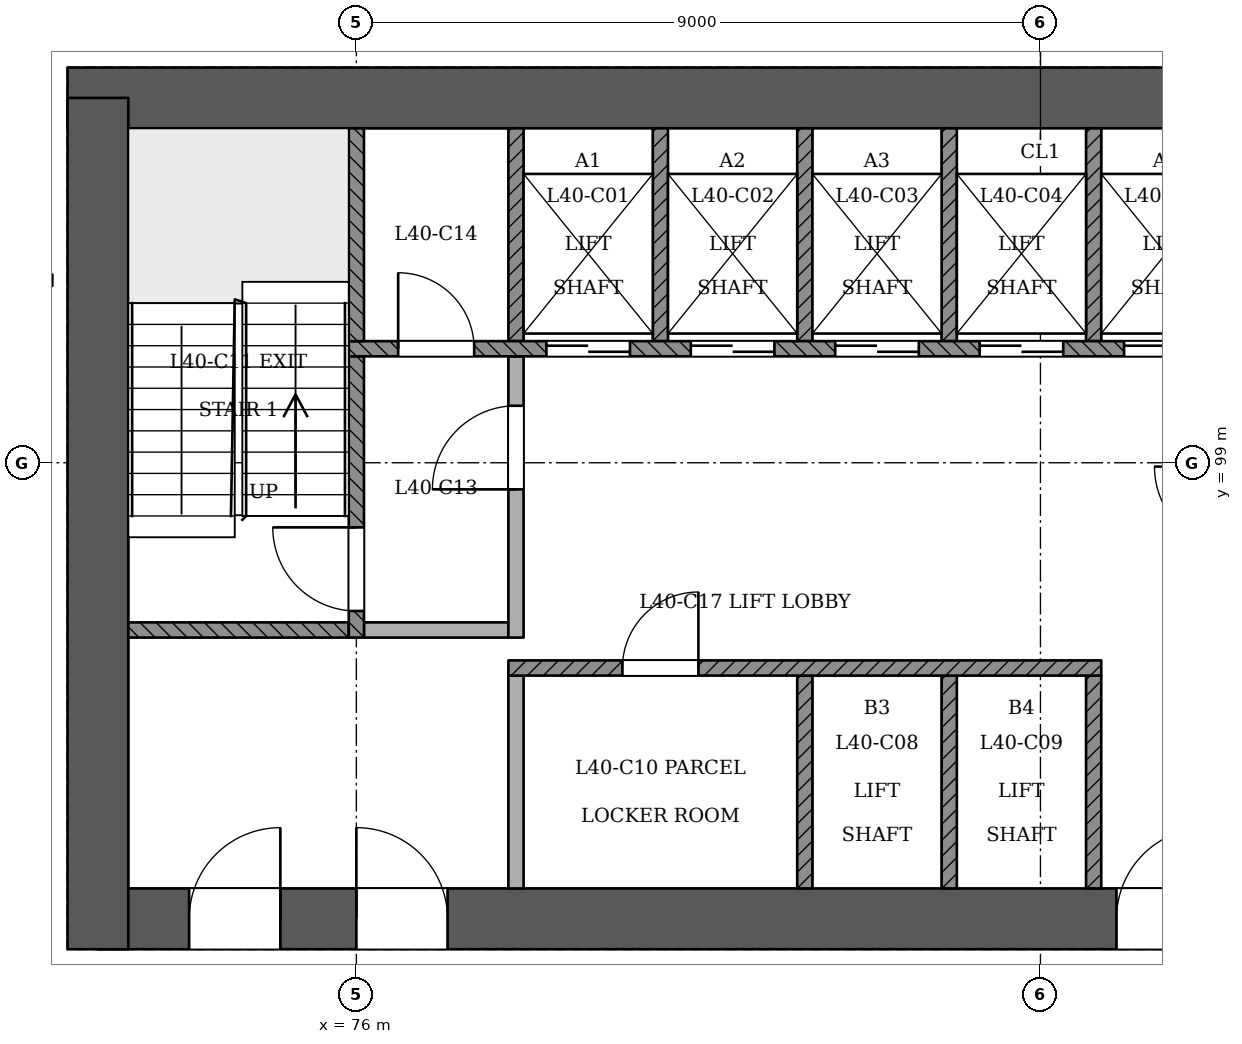
"""IFC4 building model, lengths in metres.
Left out: names, types, materials, properties, quantities, classifications, styles, units other than length and angle.
Written with IfcOpenShell. Run it as: python <this file> out.ifc"""

import sys

from ifc_helpers import new_model, si_unit, direction, frame, frame_2d, origin, place, context, subcontext, project, spatial, rectangle, extrude, element, fill, save


model = new_model("IFC4")
c1 = context("Model", 3, precision=1e-05, world=origin(), true_north=direction((0.0, 1.0)))
c2 = subcontext(c1, "Body", "Model", "MODEL_VIEW")
j1 = project(units=[si_unit("LENGTHUNIT", "METRE"), si_unit("PLANEANGLEUNIT", "RADIAN")], contexts=[c1])
p1 = place(None, origin())
s1 = spatial("IfcSite", under=j1, at=p1, CompositionType="ELEMENT")
p2 = place(p1, origin())
s2 = spatial("IfcBuilding", under=s1, at=p2, CompositionType="ELEMENT")
p3 = place(p2, frame((0.0, 0.0, 156.6)))
s3 = spatial("IfcBuildingStorey", under=s2, at=p3, CompositionType="ELEMENT", Elevation=156.6)
p4 = place(p3, frame((72.6, 93.0, 0.0), z_axis=(0.0, 0.0, 1.0), x_axis=(1.0, 0.0, 0.0)))
e1 = element("IfcWall", 1, at=p4, inside=s3, PredefinedType="SHEAR", context=c2, shape_type="SweptSolid", body=[
    extrude(rectangle(XDim=25.2, YDim=0.8, at=frame_2d((12.6, 0.0))), origin(), (0.0, 0.0, 1.0), 3.6),
])
p5 = place(p4, frame((1.2, 0.0, 0.0)))
e2 = element("IfcOpeningElement", 2, at=p5, cuts=e1, PredefinedType="OPENING", context=c2, shape_type="SweptSolid", body=[
    extrude(rectangle(XDim=1.2, YDim=2.1, at=frame_2d((0.6, 1.05))), frame((0.0, 0.411, 0.0), z_axis=(0.0, -1.0, 0.0), x_axis=(1.0, 0.0, 0.0)), (0.0, 0.0, 1.0), 0.821),
])
p6 = place(p4, frame((3.4, 0.0, 0.0)))
e3 = element("IfcOpeningElement", 3, at=p6, cuts=e1, PredefinedType="OPENING", context=c2, shape_type="SweptSolid", body=[
    extrude(rectangle(XDim=1.2, YDim=2.1, at=frame_2d((0.6, 1.05))), frame((0.0, 0.411, 0.0), z_axis=(0.0, -1.0, 0.0), x_axis=(1.0, 0.0, 0.0)), (0.0, 0.0, 1.0), 0.821),
])
p7 = place(p4, frame((13.4, 0.0, 0.0)))
e4 = element("IfcOpeningElement", 4, at=p7, cuts=e1, PredefinedType="OPENING", context=c2, shape_type="SweptSolid", body=[
    extrude(rectangle(XDim=1.2, YDim=2.1, at=frame_2d((0.6, 1.05))), frame((0.0, 0.411, 0.0), z_axis=(0.0, -1.0, 0.0), x_axis=(1.0, 0.0, 0.0)), (0.0, 0.0, 1.0), 0.821),
])
p8 = place(p4, frame((15.712, 0.0, 0.0)))
e5 = element("IfcOpeningElement", 5, at=p8, cuts=e1, PredefinedType="OPENING", context=c2, shape_type="SweptSolid", body=[
    extrude(rectangle(XDim=1.0, YDim=2.1, at=frame_2d((0.5, 1.05))), frame((0.0, 0.411, 0.0), z_axis=(0.0, -1.0, 0.0), x_axis=(1.0, 0.0, 0.0)), (0.0, 0.0, 1.0), 0.821),
])
p9 = place(p4, frame((19.15, 0.0, 0.0)))
e6 = element("IfcOpeningElement", 6, at=p9, cuts=e1, PredefinedType="OPENING", context=c2, shape_type="SweptSolid", body=[
    extrude(rectangle(XDim=1.0, YDim=2.1, at=frame_2d((0.5, 1.05))), frame((0.0, 0.411, 0.0), z_axis=(0.0, -1.0, 0.0), x_axis=(1.0, 0.0, 0.0)), (0.0, 0.0, 1.0), 0.821),
])
p10 = place(p4, frame((22.688, 0.0, 0.0)))
e7 = element("IfcOpeningElement", 7, at=p10, cuts=e1, PredefinedType="OPENING", context=c2, shape_type="SweptSolid", body=[
    extrude(rectangle(XDim=1.0, YDim=2.1, at=frame_2d((0.5, 1.05))), frame((0.0, 0.411, 0.0), z_axis=(0.0, -1.0, 0.0), x_axis=(1.0, 0.0, 0.0)), (0.0, 0.0, 1.0), 0.821),
])
p11 = place(p3, frame((97.4, 103.8, 0.0), z_axis=(0.0, 0.0, 1.0), x_axis=(-1.0, 0.0, 0.0)))
e8 = element("IfcWall", 8, at=p11, inside=s3, PredefinedType="SHEAR", context=c2, shape_type="SweptSolid", body=[
    extrude(rectangle(XDim=25.2, YDim=0.8, at=frame_2d((12.6, 0.0))), origin(), (0.0, 0.0, 1.0), 3.6),
])
p12 = place(p3, frame((72.6, 103.8, 0.0), z_axis=(0.0, 0.0, 1.0), x_axis=(0.0, -1.0, 0.0)))
e9 = element("IfcWall", 9, at=p12, inside=s3, PredefinedType="SHEAR", context=c2, shape_type="SweptSolid", body=[
    extrude(rectangle(XDim=11.2, YDim=0.8, at=frame_2d((5.6, 0.0))), origin(), (0.0, 0.0, 1.0), 3.6),
])
p13 = place(p3, frame((66.322, 97.326, 0.0), z_axis=(0.0, 0.0, 1.0), x_axis=(0.4999994764, -0.866025706085, 0.0)))
e10 = element("IfcWall", 10, at=p13, inside=s3, PredefinedType="PARTITIONING", context=c2, shape_type="SweptSolid", body=[
    extrude(rectangle(XDim=37.355, YDim=0.15, at=frame_2d((18.678, 0.0))), origin(), (0.0, 0.0, 1.0), 2.75),
])
p14 = place(p13, frame((2.8, 0.0, 0.0)))
e11 = element("IfcOpeningElement", 11, at=p14, cuts=e10, PredefinedType="OPENING", context=c2, shape_type="SweptSolid", body=[
    extrude(rectangle(XDim=1.2, YDim=2.1, at=frame_2d((0.6, 1.05))), frame((0.0, 0.085, 0.0), z_axis=(0.0, -1.0, 0.0), x_axis=(1.0, 0.0, 0.0)), (0.0, 0.0, 1.0), 0.171),
])
p15 = place(p13, frame((11.8, 0.0, 0.0)))
e12 = element("IfcOpeningElement", 12, at=p15, cuts=e10, PredefinedType="OPENING", context=c2, shape_type="SweptSolid", body=[
    extrude(rectangle(XDim=1.2, YDim=2.1, at=frame_2d((0.6, 1.05))), frame((0.0, 0.085, 0.0), z_axis=(0.0, -1.0, 0.0), x_axis=(1.0, 0.0, 0.0)), (0.0, 0.0, 1.0), 0.171),
])
p16 = place(p13, frame((24.15, 0.0, 0.0)))
e13 = element("IfcOpeningElement", 13, at=p16, cuts=e10, PredefinedType="OPENING", context=c2, shape_type="SweptSolid", body=[
    extrude(rectangle(XDim=1.2, YDim=2.1, at=frame_2d((0.6, 1.05))), frame((0.0, 0.085, 0.0), z_axis=(0.0, -1.0, 0.0), x_axis=(1.0, 0.0, 0.0)), (0.0, 0.0, 1.0), 0.171),
])
p17 = place(p13, frame((33.25, 0.0, 0.0)))
e14 = element("IfcOpeningElement", 14, at=p17, cuts=e10, PredefinedType="OPENING", context=c2, shape_type="SweptSolid", body=[
    extrude(rectangle(XDim=1.0, YDim=2.1, at=frame_2d((0.5, 1.05))), frame((0.0, 0.085, 0.0), z_axis=(0.0, -1.0, 0.0), x_axis=(1.0, 0.0, 0.0)), (0.0, 0.0, 1.0), 0.171),
])
p18 = place(p3, frame((85.065, 65.088, 0.0), z_axis=(0.0, 0.0, 1.0), x_axis=(0.500000254076, 0.866025257093, 0.0)))
e15 = element("IfcWall", 15, at=p18, inside=s3, PredefinedType="PARTITIONING", context=c2, shape_type="SweptSolid", body=[
    extrude(rectangle(XDim=37.226, YDim=0.15, at=frame_2d((18.613, 0.0))), origin(), (0.0, 0.0, 1.0), 2.75),
])
p19 = place(p18, frame((0.542, 0.0, 0.0)))
e16 = element("IfcOpeningElement", 16, at=p19, cuts=e15, PredefinedType="OPENING", context=c2, shape_type="SweptSolid", body=[
    extrude(rectangle(XDim=1.2, YDim=2.1, at=frame_2d((0.6, 1.05))), frame((0.0, 0.085, 0.0), z_axis=(0.0, -1.0, 0.0), x_axis=(1.0, 0.0, 0.0)), (0.0, 0.0, 1.0), 0.171),
])
p20 = place(p18, frame((11.876, 0.0, 0.0)))
e17 = element("IfcOpeningElement", 17, at=p20, cuts=e15, PredefinedType="OPENING", context=c2, shape_type="SweptSolid", body=[
    extrude(rectangle(XDim=1.2, YDim=2.1, at=frame_2d((0.6, 1.05))), frame((0.0, 0.085, 0.0), z_axis=(0.0, -1.0, 0.0), x_axis=(1.0, 0.0, 0.0)), (0.0, 0.0, 1.0), 0.171),
])
p21 = place(p18, frame((22.026, 0.0, 0.0)))
e18 = element("IfcOpeningElement", 18, at=p21, cuts=e15, PredefinedType="OPENING", context=c2, shape_type="SweptSolid", body=[
    extrude(rectangle(XDim=1.2, YDim=2.1, at=frame_2d((0.6, 1.05))), frame((0.0, 0.085, 0.0), z_axis=(0.0, -1.0, 0.0), x_axis=(1.0, 0.0, 0.0)), (0.0, 0.0, 1.0), 0.171),
])
p22 = place(p18, frame((31.026, 0.0, 0.0)))
e19 = element("IfcOpeningElement", 19, at=p22, cuts=e15, PredefinedType="OPENING", context=c2, shape_type="SweptSolid", body=[
    extrude(rectangle(XDim=1.2, YDim=2.1, at=frame_2d((0.6, 1.05))), frame((0.0, 0.085, 0.0), z_axis=(0.0, -1.0, 0.0), x_axis=(1.0, 0.0, 0.0)), (0.0, 0.0, 1.0), 0.171),
])
p23 = place(p3, frame((78.1, 93.4, 0.0), z_axis=(0.0, 0.0, 1.0), x_axis=(0.0, 1.0, 0.0)))
e20 = element("IfcWall", 20, at=p23, inside=s3, PredefinedType="PARTITIONING", context=c2, shape_type="SweptSolid", body=[
    extrude(rectangle(XDim=2.8, YDim=0.2, at=frame_2d((1.4, 0.0))), origin(), (0.0, 0.0, 1.0), 3.15),
])
for number, where, z_axis, x_axis in (
    (21, (81.9, 93.4, 0.0), (0.0, 0.0, 1.0), (0.0, 1.0, 0.0)),
    (22, (83.8, 93.4, 0.0), (0.0, 0.0, 1.0), (0.0, 1.0, 0.0)),
    (23, (85.7, 93.4, 0.0), (0.0, 0.0, 1.0), (0.0, 1.0, 0.0)),
):
    element("IfcWall", number, at=place(p3, frame(where, z_axis=z_axis, x_axis=x_axis)), inside=s3, PredefinedType="SOLIDWALL", context=c2, shape_type="SweptSolid", body=[
        extrude(rectangle(XDim=2.8, YDim=0.2, at=frame_2d((1.4, 0.0))), origin(), (0.0, 0.0, 1.0), 3.15),
    ])
p24 = place(p3, frame((78.0, 96.3, 0.0), z_axis=(0.0, 0.0, 1.0), x_axis=(1.0, 0.0, 0.0)))
e24 = element("IfcWall", 24, at=p24, inside=s3, PredefinedType="SOLIDWALL", context=c2, shape_type="SweptSolid", body=[
    extrude(rectangle(XDim=7.8, YDim=0.2, at=frame_2d((3.9, 0.0))), origin(), (0.0, 0.0, 1.0), 3.15),
])
p25 = place(p24, frame((1.5, 0.0, 0.0)))
e25 = element("IfcOpeningElement", 25, at=p25, cuts=e24, PredefinedType="OPENING", context=c2, shape_type="SweptSolid", body=[
    extrude(rectangle(XDim=1.0, YDim=2.1, at=frame_2d((0.5, 1.05))), frame((0.0, 0.11, 0.0), z_axis=(0.0, -1.0, 0.0), x_axis=(1.0, 0.0, 0.0)), (0.0, 0.0, 1.0), 0.221),
])
p26 = place(p3, frame((73.0, 96.8, 0.0), z_axis=(0.0, 0.0, 1.0), x_axis=(1.0, 0.0, 0.0)))
e26 = element("IfcWall", 26, at=p26, inside=s3, PredefinedType="SOLIDWALL", context=c2, shape_type="SweptSolid", body=[
    extrude(rectangle(XDim=2.9, YDim=0.2, at=frame_2d((1.45, 0.0))), origin(), (0.0, 0.0, 1.0), 3.15),
])
p27 = place(p3, frame((76.0, 96.7, 0.0), z_axis=(0.0, 0.0, 1.0), x_axis=(0.0, 1.0, 0.0)))
e27 = element("IfcWall", 27, at=p27, inside=s3, PredefinedType="SOLIDWALL", context=c2, shape_type="SweptSolid", body=[
    extrude(rectangle(XDim=3.7, YDim=0.2, at=frame_2d((1.85, 0.0))), origin(), (0.0, 0.0, 1.0), 3.15),
])
p28 = place(p27, frame((0.35, 0.0, 0.0)))
e28 = element("IfcOpeningElement", 28, at=p28, cuts=e27, PredefinedType="OPENING", context=c2, shape_type="SweptSolid", body=[
    extrude(rectangle(XDim=1.1, YDim=2.1, at=frame_2d((0.55, 1.05))), frame((0.0, 0.11, 0.0), z_axis=(0.0, -1.0, 0.0), x_axis=(1.0, 0.0, 0.0)), (0.0, 0.0, 1.0), 0.221),
])
p29 = place(p3, frame((76.1, 96.8, 0.0), z_axis=(0.0, 0.0, 1.0), x_axis=(1.0, 0.0, 0.0)))
e29 = element("IfcWall", 29, at=p29, inside=s3, PredefinedType="PARTITIONING", context=c2, shape_type="SweptSolid", body=[
    extrude(rectangle(XDim=1.9, YDim=0.2, at=frame_2d((0.95, 0.0))), origin(), (0.0, 0.0, 1.0), 3.15),
])
p30 = place(p3, frame((78.1, 96.7, 0.0), z_axis=(0.0, 0.0, 1.0), x_axis=(0.0, 1.0, 0.0)))
e30 = element("IfcWall", 30, at=p30, inside=s3, PredefinedType="PARTITIONING", context=c2, shape_type="SweptSolid", body=[
    extrude(rectangle(XDim=3.7, YDim=0.2, at=frame_2d((1.85, 0.0))), origin(), (0.0, 0.0, 1.0), 3.15),
])
p31 = place(p30, frame((1.95, 0.0, 0.0)))
e31 = element("IfcOpeningElement", 31, at=p31, cuts=e30, PredefinedType="OPENING", context=c2, shape_type="SweptSolid", body=[
    extrude(rectangle(XDim=1.1, YDim=2.1, at=frame_2d((0.55, 1.05))), frame((0.0, 0.11, 0.0), z_axis=(0.0, -1.0, 0.0), x_axis=(1.0, 0.0, 0.0)), (0.0, 0.0, 1.0), 0.221),
])
p32 = place(p3, frame((75.9, 100.5, 0.0), z_axis=(0.0, 0.0, 1.0), x_axis=(1.0, 0.0, 0.0)))
e32 = element("IfcWall", 32, at=p32, inside=s3, PredefinedType="SOLIDWALL", context=c2, shape_type="SweptSolid", body=[
    extrude(rectangle(XDim=18.2, YDim=0.2, at=frame_2d((9.1, 0.0))), origin(), (0.0, 0.0, 1.0), 3.15),
])
p33 = place(p32, frame((2.6, 0.0, 0.0)))
e33 = element("IfcOpeningElement", 33, at=p33, cuts=e32, PredefinedType="OPENING", context=c2, shape_type="SweptSolid", body=[
    extrude(rectangle(XDim=1.1, YDim=2.1, at=frame_2d((0.55, 1.05))), frame((0.0, 0.11, 0.0), z_axis=(0.0, -1.0, 0.0), x_axis=(1.0, 0.0, 0.0)), (0.0, 0.0, 1.0), 0.221),
])
p34 = place(p32, frame((4.5, 0.0, 0.0)))
e34 = element("IfcOpeningElement", 34, at=p34, cuts=e32, PredefinedType="OPENING", context=c2, shape_type="SweptSolid", body=[
    extrude(rectangle(XDim=1.1, YDim=2.1, at=frame_2d((0.55, 1.05))), frame((0.0, 0.11, 0.0), z_axis=(0.0, -1.0, 0.0), x_axis=(1.0, 0.0, 0.0)), (0.0, 0.0, 1.0), 0.221),
])
p35 = place(p32, frame((6.4, 0.0, 0.0)))
e35 = element("IfcOpeningElement", 35, at=p35, cuts=e32, PredefinedType="OPENING", context=c2, shape_type="SweptSolid", body=[
    extrude(rectangle(XDim=1.1, YDim=2.1, at=frame_2d((0.55, 1.05))), frame((0.0, 0.11, 0.0), z_axis=(0.0, -1.0, 0.0), x_axis=(1.0, 0.0, 0.0)), (0.0, 0.0, 1.0), 0.221),
])
p36 = place(p32, frame((8.3, 0.0, 0.0)))
e36 = element("IfcOpeningElement", 36, at=p36, cuts=e32, PredefinedType="OPENING", context=c2, shape_type="SweptSolid", body=[
    extrude(rectangle(XDim=1.1, YDim=2.1, at=frame_2d((0.55, 1.05))), frame((0.0, 0.11, 0.0), z_axis=(0.0, -1.0, 0.0), x_axis=(1.0, 0.0, 0.0)), (0.0, 0.0, 1.0), 0.221),
])
p37 = place(p32, frame((10.2, 0.0, 0.0)))
e37 = element("IfcOpeningElement", 37, at=p37, cuts=e32, PredefinedType="OPENING", context=c2, shape_type="SweptSolid", body=[
    extrude(rectangle(XDim=1.1, YDim=2.1, at=frame_2d((0.55, 1.05))), frame((0.0, 0.11, 0.0), z_axis=(0.0, -1.0, 0.0), x_axis=(1.0, 0.0, 0.0)), (0.0, 0.0, 1.0), 0.221),
])
p38 = place(p32, frame((12.1, 0.0, 0.0)))
e38 = element("IfcOpeningElement", 38, at=p38, cuts=e32, PredefinedType="OPENING", context=c2, shape_type="SweptSolid", body=[
    extrude(rectangle(XDim=1.1, YDim=2.1, at=frame_2d((0.55, 1.05))), frame((0.0, 0.11, 0.0), z_axis=(0.0, -1.0, 0.0), x_axis=(1.0, 0.0, 0.0)), (0.0, 0.0, 1.0), 0.221),
])
p39 = place(p32, frame((14.0, 0.0, 0.0)))
e39 = element("IfcOpeningElement", 39, at=p39, cuts=e32, PredefinedType="OPENING", context=c2, shape_type="SweptSolid", body=[
    extrude(rectangle(XDim=1.1, YDim=2.1, at=frame_2d((0.55, 1.05))), frame((0.0, 0.11, 0.0), z_axis=(0.0, -1.0, 0.0), x_axis=(1.0, 0.0, 0.0)), (0.0, 0.0, 1.0), 0.221),
])
p40 = place(p32, frame((0.65, 0.0, 0.0)))
e40 = element("IfcOpeningElement", 40, at=p40, cuts=e32, PredefinedType="OPENING", context=c2, shape_type="SweptSolid", body=[
    extrude(rectangle(XDim=1.0, YDim=2.1, at=frame_2d((0.5, 1.05))), frame((0.0, 0.11, 0.0), z_axis=(0.0, -1.0, 0.0), x_axis=(1.0, 0.0, 0.0)), (0.0, 0.0, 1.0), 0.221),
])
p41 = place(p32, frame((16.3, 0.0, 0.0)))
e41 = element("IfcOpeningElement", 41, at=p41, cuts=e32, PredefinedType="OPENING", context=c2, shape_type="SweptSolid", body=[
    extrude(rectangle(XDim=1.0, YDim=2.1, at=frame_2d((0.5, 1.05))), frame((0.0, 0.11, 0.0), z_axis=(0.0, -1.0, 0.0), x_axis=(1.0, 0.0, 0.0)), (0.0, 0.0, 1.0), 0.221),
])
for number, where, z_axis, x_axis in (
    (42, (76.0, 100.6, 0.0), (0.0, 0.0, 1.0), (0.0, 1.0, 0.0)),
    (43, (78.1, 100.6, 0.0), (0.0, 0.0, 1.0), (0.0, 1.0, 0.0)),
    (44, (80.0, 100.6, 0.0), (0.0, 0.0, 1.0), (0.0, 1.0, 0.0)),
    (45, (81.9, 100.6, 0.0), (0.0, 0.0, 1.0), (0.0, 1.0, 0.0)),
    (46, (83.8, 100.6, 0.0), (0.0, 0.0, 1.0), (0.0, 1.0, 0.0)),
    (47, (85.7, 100.6, 0.0), (0.0, 0.0, 1.0), (0.0, 1.0, 0.0)),
):
    element("IfcWall", number, at=place(p3, frame(where, z_axis=z_axis, x_axis=x_axis)), inside=s3, PredefinedType="SOLIDWALL", context=c2, shape_type="SweptSolid", body=[
        extrude(rectangle(XDim=2.8, YDim=0.2, at=frame_2d((1.4, 0.0))), origin(), (0.0, 0.0, 1.0), 3.15),
    ])
p42 = place(p33, origin())
e48 = element("IfcDoor", 48, at=p42, inside=s3, OperationType="SLIDING_TO_RIGHT", PredefinedType="NOTDEFINED", context=c2, shape_type="SweptSolid", body=[
    extrude(rectangle(XDim=1.1, YDim=2.1, at=frame_2d((0.55, 1.05))), frame((0.0, 0.025, 0.0), z_axis=(0.0, -1.0, 0.0), x_axis=(1.0, 0.0, 0.0)), (0.0, 0.0, 1.0), 0.05),
])
fill(e33, e48)
p43 = place(p34, origin())
e49 = element("IfcDoor", 49, at=p43, inside=s3, OperationType="SLIDING_TO_LEFT", PredefinedType="NOTDEFINED", context=c2, shape_type="SweptSolid", body=[
    extrude(rectangle(XDim=1.1, YDim=2.1, at=frame_2d((0.55, 1.05))), frame((0.0, 0.025, 0.0), z_axis=(0.0, -1.0, 0.0), x_axis=(1.0, 0.0, 0.0)), (0.0, 0.0, 1.0), 0.05),
])
fill(e34, e49)
p44 = place(p35, origin())
e50 = element("IfcDoor", 50, at=p44, inside=s3, OperationType="SLIDING_TO_RIGHT", PredefinedType="NOTDEFINED", context=c2, shape_type="SweptSolid", body=[
    extrude(rectangle(XDim=1.1, YDim=2.1, at=frame_2d((0.55, 1.05))), frame((0.0, 0.025, 0.0), z_axis=(0.0, -1.0, 0.0), x_axis=(1.0, 0.0, 0.0)), (0.0, 0.0, 1.0), 0.05),
])
fill(e35, e50)
p45 = place(p36, origin())
e51 = element("IfcDoor", 51, at=p45, inside=s3, OperationType="SLIDING_TO_LEFT", PredefinedType="NOTDEFINED", context=c2, shape_type="SweptSolid", body=[
    extrude(rectangle(XDim=1.1, YDim=2.1, at=frame_2d((0.55, 1.05))), frame((0.0, 0.025, 0.0), z_axis=(0.0, -1.0, 0.0), x_axis=(1.0, 0.0, 0.0)), (0.0, 0.0, 1.0), 0.05),
])
fill(e36, e51)
p46 = place(p37, origin())
e52 = element("IfcDoor", 52, at=p46, inside=s3, OperationType="SLIDING_TO_RIGHT", PredefinedType="NOTDEFINED", context=c2, shape_type="SweptSolid", body=[
    extrude(rectangle(XDim=1.1, YDim=2.1, at=frame_2d((0.55, 1.05))), frame((0.0, 0.025, 0.0), z_axis=(0.0, -1.0, 0.0), x_axis=(1.0, 0.0, 0.0)), (0.0, 0.0, 1.0), 0.05),
])
fill(e37, e52)
p47 = place(p28, origin())
e53 = element("IfcDoor", 53, at=p47, inside=s3, OperationType="SINGLE_SWING_RIGHT", PredefinedType="NOTDEFINED", context=c2, shape_type="SweptSolid", body=[
    extrude(rectangle(XDim=1.1, YDim=2.1, at=frame_2d((0.55, 1.05))), frame((0.0, 0.025, 0.0), z_axis=(0.0, -1.0, 0.0), x_axis=(1.0, 0.0, 0.0)), (0.0, 0.0, 1.0), 0.05),
])
fill(e28, e53)
p48 = place(p31, origin())
e54 = element("IfcDoor", 54, at=p48, inside=s3, OperationType="SINGLE_SWING_LEFT", PredefinedType="NOTDEFINED", context=c2, shape_type="SweptSolid", body=[
    extrude(rectangle(XDim=1.1, YDim=2.1, at=frame_2d((0.55, 1.05))), frame((0.0, 0.025, 0.0), z_axis=(0.0, -1.0, 0.0), x_axis=(1.0, 0.0, 0.0)), (0.0, 0.0, 1.0), 0.05),
])
fill(e31, e54)
p49 = place(p5, origin())
e55 = element("IfcDoor", 55, at=p49, inside=s3, OperationType="SINGLE_SWING_RIGHT", PredefinedType="NOTDEFINED", context=c2, shape_type="SweptSolid", body=[
    extrude(rectangle(XDim=1.2, YDim=2.1, at=frame_2d((0.6, 1.05))), frame((0.0, 0.025, 0.0), z_axis=(0.0, -1.0, 0.0), x_axis=(1.0, 0.0, 0.0)), (0.0, 0.0, 1.0), 0.05),
])
fill(e2, e55)
p50 = place(p6, origin())
e56 = element("IfcDoor", 56, at=p50, inside=s3, OperationType="SINGLE_SWING_LEFT", PredefinedType="NOTDEFINED", context=c2, shape_type="SweptSolid", body=[
    extrude(rectangle(XDim=1.2, YDim=2.1, at=frame_2d((0.6, 1.05))), frame((0.0, 0.025, 0.0), z_axis=(0.0, -1.0, 0.0), x_axis=(1.0, 0.0, 0.0)), (0.0, 0.0, 1.0), 0.05),
])
fill(e3, e56)
p51 = place(p7, origin())
e57 = element("IfcDoor", 57, at=p51, inside=s3, OperationType="SINGLE_SWING_RIGHT", PredefinedType="NOTDEFINED", context=c2, shape_type="SweptSolid", body=[
    extrude(rectangle(XDim=1.2, YDim=2.1, at=frame_2d((0.6, 1.05))), frame((0.0, 0.025, 0.0), z_axis=(0.0, -1.0, 0.0), x_axis=(1.0, 0.0, 0.0)), (0.0, 0.0, 1.0), 0.05),
])
fill(e4, e57)
p52 = place(p40, origin())
e58 = element("IfcDoor", 58, at=p52, inside=s3, OperationType="SINGLE_SWING_LEFT", PredefinedType="NOTDEFINED", context=c2, shape_type="SweptSolid", body=[
    extrude(rectangle(XDim=1.0, YDim=2.1, at=frame_2d((0.5, 1.05))), frame((0.0, 0.025, 0.0), z_axis=(0.0, -1.0, 0.0), x_axis=(1.0, 0.0, 0.0)), (0.0, 0.0, 1.0), 0.05),
])
fill(e40, e58)
p53 = place(p25, origin())
e59 = element("IfcDoor", 59, at=p53, inside=s3, OperationType="SINGLE_SWING_RIGHT", PredefinedType="NOTDEFINED", context=c2, shape_type="SweptSolid", body=[
    extrude(rectangle(XDim=1.0, YDim=2.1, at=frame_2d((0.5, 1.05))), frame((0.0, 0.025, 0.0), z_axis=(0.0, -1.0, 0.0), x_axis=(1.0, 0.0, 0.0)), (0.0, 0.0, 1.0), 0.05),
])
fill(e25, e59)
save(model, sys.argv[1])
